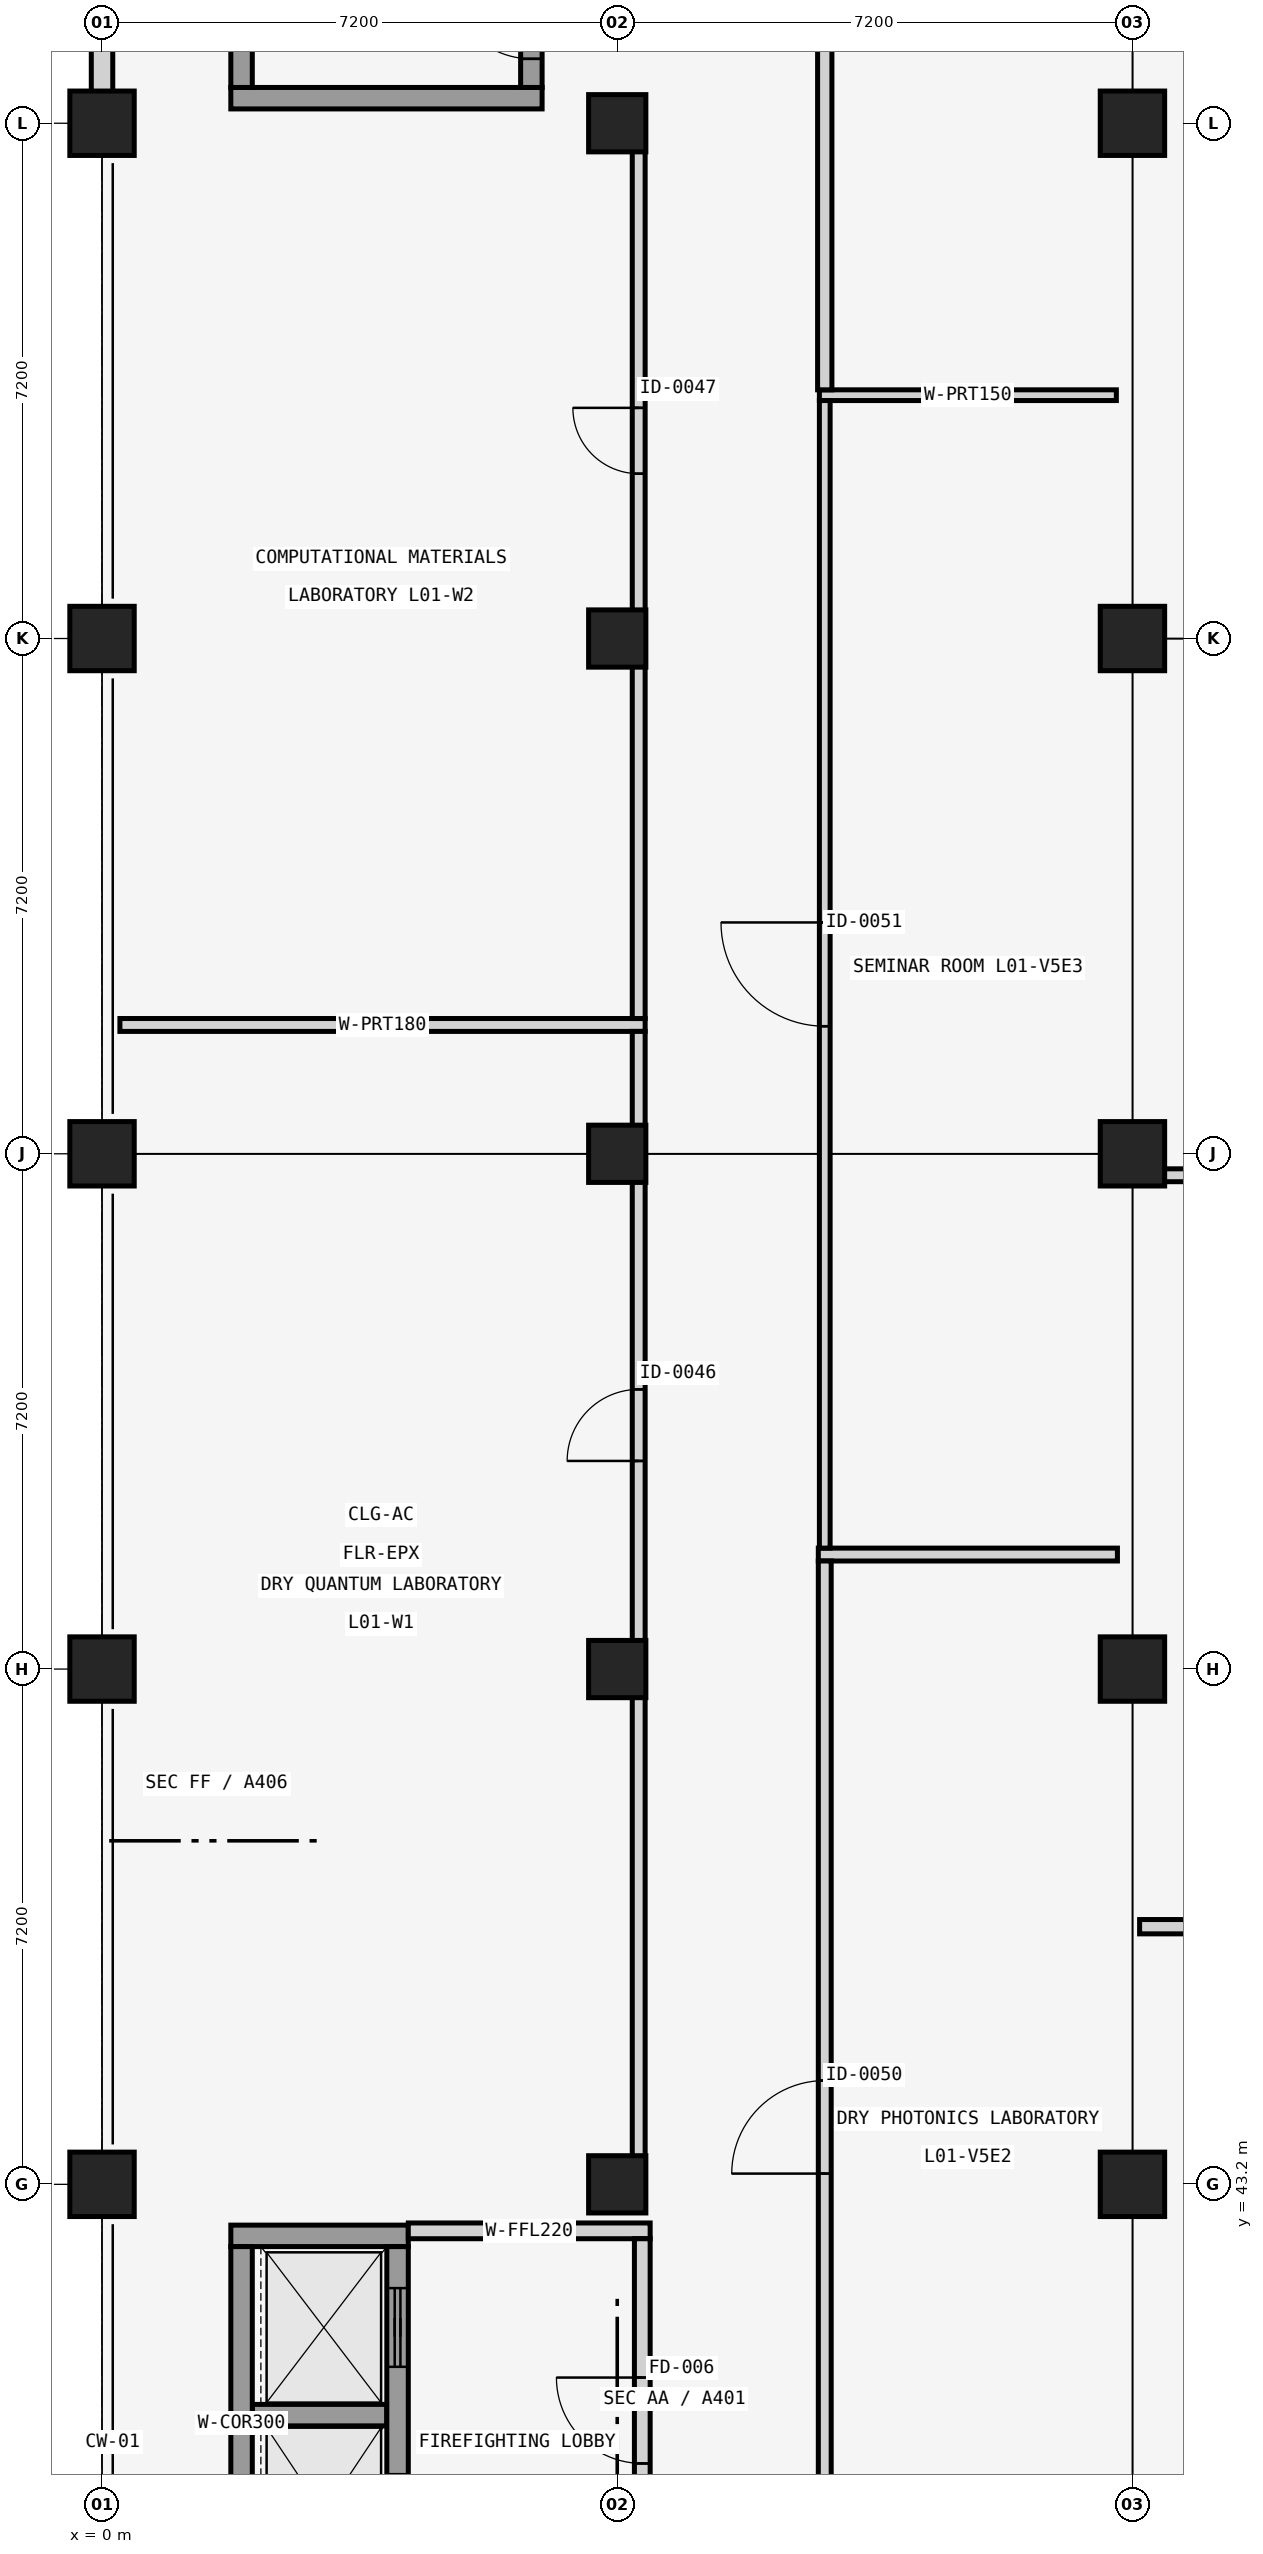
"""IFC4 building model, lengths in metres.
Left out: names, types, materials, properties, quantities, classifications, styles, units other than length and angle.
Written with IfcOpenShell. Run it as: python <this file> out.ifc"""

import sys

from ifc_helpers import new_model, si_unit, direction, frame, frame_2d, origin, origin_2d, place, context, subcontext, project, spatial, rectangle, extrude, element, fill, save


model = new_model("IFC4")
c1 = context("Model", 3, precision=1e-05, world=origin(), true_north=direction((0.0, 1.0)))
c2 = subcontext(c1, "Body", "Model", "MODEL_VIEW")
j1 = project(units=[si_unit("LENGTHUNIT", "METRE"), si_unit("PLANEANGLEUNIT", "RADIAN")], contexts=[c1])
p1 = place(None, origin())
s1 = spatial("IfcSite", under=j1, at=p1, CompositionType="ELEMENT")
p2 = place(p1, origin())
s2 = spatial("IfcBuilding", under=s1, at=p2, CompositionType="ELEMENT")
p3 = place(p2, frame((0.0, 0.0, 4.8)))
s3 = spatial("IfcBuildingStorey", under=s2, at=p3, CompositionType="ELEMENT", Elevation=4.8)
for number, where, z_axis, x_axis in (
    (1, (0.0, 43.2, 0.0), (0.0, 0.0, 1.0), (1.0, 0.0, 0.0)),
    (2, (0.0, 50.4, 0.0), (0.0, 0.0, 1.0), (1.0, 0.0, 0.0)),
    (3, (0.0, 57.6, 0.0), (0.0, 0.0, 1.0), (1.0, 0.0, 0.0)),
    (4, (0.0, 64.8, 0.0), (0.0, 0.0, 1.0), (1.0, 0.0, 0.0)),
    (5, (0.0, 72.0, 0.0), (0.0, 0.0, 1.0), (1.0, 0.0, 0.0)),
):
    element("IfcColumn", number, at=place(p3, frame(where, z_axis=z_axis, x_axis=x_axis)), inside=s3, PredefinedType="COLUMN", context=c2, shape_type="SweptSolid", body=[
        extrude(rectangle(XDim=0.9, YDim=0.9, at=origin_2d()), origin(), (0.0, 0.0, 1.0), 4.16),
    ])
for number, where, z_axis, x_axis in (
    (6, (7.2, 43.2, 0.0), (0.0, 0.0, 1.0), (1.0, 0.0, 0.0)),
    (7, (7.2, 50.4, 0.0), (0.0, 0.0, 1.0), (1.0, 0.0, 0.0)),
    (8, (7.2, 57.6, 0.0), (0.0, 0.0, 1.0), (1.0, 0.0, 0.0)),
    (9, (7.2, 64.8, 0.0), (0.0, 0.0, 1.0), (1.0, 0.0, 0.0)),
    (10, (7.2, 72.0, 0.0), (0.0, 0.0, 1.0), (1.0, 0.0, 0.0)),
):
    element("IfcColumn", number, at=place(p3, frame(where, z_axis=z_axis, x_axis=x_axis)), inside=s3, PredefinedType="COLUMN", context=c2, shape_type="SweptSolid", body=[
        extrude(rectangle(XDim=0.8, YDim=0.8, at=origin_2d()), origin(), (0.0, 0.0, 1.0), 4.16),
    ])
for number, where, z_axis, x_axis in (
    (11, (14.4, 43.2, 0.0), (0.0, 0.0, 1.0), (1.0, 0.0, 0.0)),
    (12, (14.4, 50.4, 0.0), (0.0, 0.0, 1.0), (1.0, 0.0, 0.0)),
    (13, (14.4, 57.6, 0.0), (0.0, 0.0, 1.0), (1.0, 0.0, 0.0)),
    (14, (14.4, 64.8, 0.0), (0.0, 0.0, 1.0), (1.0, 0.0, 0.0)),
    (15, (14.4, 72.0, 0.0), (0.0, 0.0, 1.0), (1.0, 0.0, 0.0)),
):
    element("IfcColumn", number, at=place(p3, frame(where, z_axis=z_axis, x_axis=x_axis)), inside=s3, PredefinedType="COLUMN", context=c2, shape_type="SweptSolid", body=[
        extrude(rectangle(XDim=0.9, YDim=0.9, at=origin_2d()), origin(), (0.0, 0.0, 1.0), 4.16),
    ])
p4 = place(p3, frame((0.0, 72.44, 0.0), z_axis=(0.0, 0.0, 1.0), x_axis=(0.0, 1.0, 0.0)))
e16 = element("IfcWall", 16, at=p4, inside=s3, PredefinedType="SOLIDWALL", context=c2, shape_type="SweptSolid", body=[
    extrude(rectangle(XDim=6.32, YDim=0.3, at=frame_2d((3.16, 0.0))), origin(), (0.0, 0.0, 1.0), 3.21),
])
p5 = place(p4, frame((2.935, 0.0, 0.65)))
e17 = element("IfcOpeningElement", 17, at=p5, cuts=e16, PredefinedType="OPENING", context=c2, shape_type="SweptSolid", body=[
    extrude(rectangle(XDim=0.45, YDim=2.4, at=frame_2d((0.225, 1.2))), frame((0.0, 0.16, 0.0), z_axis=(0.0, -1.0, 0.0), x_axis=(1.0, 0.0, 0.0)), (0.0, 0.0, 1.0), 0.32),
])
p6 = place(p3, frame((1.8, 42.48, 0.0), z_axis=(0.0, 0.0, 1.0), x_axis=(1.0, 0.0, 0.0)))
e18 = element("IfcWall", 18, at=p6, inside=s3, PredefinedType="SHEAR", context=c2, shape_type="SweptSolid", body=[
    extrude(rectangle(XDim=2.48, YDim=0.3, at=frame_2d((1.24, 0.0))), origin(), (0.0, 0.0, 1.0), 3.81),
])
p7 = place(p3, frame((2.1, 39.975, 0.0), z_axis=(0.0, 0.0, 1.0), x_axis=(1.0, 0.0, 0.0)))
e19 = element("IfcWall", 19, at=p7, inside=s3, PredefinedType="SHEAR", context=c2, shape_type="SweptSolid", body=[
    extrude(rectangle(XDim=1.88, YDim=0.3, at=frame_2d((0.94, 0.0))), origin(), (0.0, 0.0, 1.0), 3.81),
])
p8 = place(p3, frame((1.95, 37.4, 0.0), z_axis=(0.0, 0.0, 1.0), x_axis=(0.0, 1.0, 0.0)))
e20 = element("IfcWall", 20, at=p8, inside=s3, PredefinedType="SHEAR", context=c2, shape_type="SweptSolid", body=[
    extrude(rectangle(XDim=4.93, YDim=0.3, at=frame_2d((2.465, 0.0))), origin(), (0.0, 0.0, 1.0), 3.81),
])
p9 = place(p3, frame((4.13, 37.4, 0.0), z_axis=(0.0, 0.0, 1.0), x_axis=(0.0, 1.0, 0.0)))
e21 = element("IfcWall", 21, at=p9, inside=s3, PredefinedType="SHEAR", context=c2, shape_type="SweptSolid", body=[
    extrude(rectangle(XDim=4.93, YDim=0.3, at=frame_2d((2.465, 0.0))), origin(), (0.0, 0.0, 1.0), 3.81),
])
p10 = place(p9, frame((0.65, 0.0, 0.0)))
e22 = element("IfcOpeningElement", 22, at=p10, cuts=e21, PredefinedType="OPENING", context=c2, shape_type="SweptSolid", body=[
    extrude(rectangle(XDim=1.1, YDim=2.2, at=frame_2d((0.55, 1.1))), frame((0.0, 0.16, 0.0), z_axis=(0.0, -1.0, 0.0), x_axis=(1.0, 0.0, 0.0)), (0.0, 0.0, 1.0), 0.32),
])
p11 = place(p9, frame((3.25, 0.0, 0.0)))
e23 = element("IfcOpeningElement", 23, at=p11, cuts=e21, PredefinedType="OPENING", context=c2, shape_type="SweptSolid", body=[
    extrude(rectangle(XDim=1.1, YDim=2.2, at=frame_2d((0.55, 1.1))), frame((0.0, 0.16, 0.0), z_axis=(0.0, -1.0, 0.0), x_axis=(1.0, 0.0, 0.0)), (0.0, 0.0, 1.0), 0.32),
])
p12 = place(p3, frame((4.28, 42.55, 0.0), z_axis=(0.0, 0.0, 1.0), x_axis=(1.0, 0.0, 0.0)))
e24 = element("IfcWall", 24, at=p12, inside=s3, PredefinedType="SOLIDWALL", context=c2, shape_type="SweptSolid", body=[
    extrude(rectangle(XDim=3.38, YDim=0.22, at=frame_2d((1.69, 0.0))), origin(), (0.0, 0.0, 1.0), 2.81),
])
p13 = place(p3, frame((7.55, 37.36, 0.0), z_axis=(0.0, 0.0, 1.0), x_axis=(0.0, 1.0, 0.0)))
e25 = element("IfcWall", 25, at=p13, inside=s3, PredefinedType="SOLIDWALL", context=c2, shape_type="SweptSolid", body=[
    extrude(rectangle(XDim=5.08, YDim=0.22, at=frame_2d((2.54, 0.0))), origin(), (0.0, 0.0, 1.0), 3.51),
])
p14 = place(p13, frame((1.94, 0.0, 0.0)))
e26 = element("IfcOpeningElement", 26, at=p14, cuts=e25, PredefinedType="OPENING", context=c2, shape_type="SweptSolid", body=[
    extrude(rectangle(XDim=1.2, YDim=2.2, at=frame_2d((0.6, 1.1))), frame((0.0, 0.12, 0.0), z_axis=(0.0, -1.0, 0.0), x_axis=(1.0, 0.0, 0.0)), (0.0, 0.0, 1.0), 0.24),
])
p15 = place(p3, frame((1.8, 72.35, 0.0), z_axis=(0.0, 0.0, 1.0), x_axis=(1.0, 0.0, 0.0)))
e27 = element("IfcWall", 27, at=p15, inside=s3, PredefinedType="SHEAR", context=c2, shape_type="SweptSolid", body=[
    extrude(rectangle(XDim=4.35, YDim=0.3, at=frame_2d((2.175, 0.0))), origin(), (0.0, 0.0, 1.0), 3.81),
])
p16 = place(p3, frame((1.95, 72.5, 0.0), z_axis=(0.0, 0.0, 1.0), x_axis=(0.0, 1.0, 0.0)))
e28 = element("IfcWall", 28, at=p16, inside=s3, PredefinedType="SHEAR", context=c2, shape_type="SweptSolid", body=[
    extrude(rectangle(XDim=7.8, YDim=0.3, at=frame_2d((3.9, 0.0))), origin(), (0.0, 0.0, 1.0), 3.81),
])
p17 = place(p3, frame((6.0, 72.5, 0.0), z_axis=(0.0, 0.0, 1.0), x_axis=(0.0, 1.0, 0.0)))
e29 = element("IfcWall", 29, at=p17, inside=s3, PredefinedType="SHEAR", context=c2, shape_type="SweptSolid", body=[
    extrude(rectangle(XDim=7.8, YDim=0.3, at=frame_2d((3.9, 0.0))), origin(), (0.0, 0.0, 1.0), 3.81),
])
p18 = place(p17, frame((0.4, 0.0, 0.0)))
e30 = element("IfcOpeningElement", 30, at=p18, cuts=e29, PredefinedType="OPENING", context=c2, shape_type="SweptSolid", body=[
    extrude(rectangle(XDim=1.15, YDim=2.2, at=frame_2d((0.575, 1.1))), frame((0.0, 0.16, 0.0), z_axis=(0.0, -1.0, 0.0), x_axis=(1.0, 0.0, 0.0)), (0.0, 0.0, 1.0), 0.32),
])
p19 = place(p3, frame((0.25, 59.4, 0.0), z_axis=(0.0, 0.0, 1.0), x_axis=(1.0, 0.0, 0.0)))
e31 = element("IfcWall", 31, at=p19, inside=s3, PredefinedType="PARTITIONING", context=c2, shape_type="SweptSolid", body=[
    extrude(rectangle(XDim=7.34, YDim=0.18, at=frame_2d((3.67, 0.0))), origin(), (0.0, 0.0, 1.0), 3.21),
])
p20 = place(p3, frame((7.5, 43.59, 0.0), z_axis=(0.0, 0.0, 1.0), x_axis=(0.0, 1.0, 0.0)))
e32 = element("IfcWall", 32, at=p20, inside=s3, PredefinedType="PARTITIONING", context=c2, shape_type="SweptSolid", body=[
    extrude(rectangle(XDim=15.72, YDim=0.18, at=frame_2d((7.86, 0.0))), origin(), (0.0, 0.0, 1.0), 3.21),
])
p21 = place(p20, frame((9.718, 0.0, 0.0)))
e33 = element("IfcOpeningElement", 33, at=p21, cuts=e32, PredefinedType="OPENING", context=c2, shape_type="SweptSolid", body=[
    extrude(rectangle(XDim=1.0, YDim=2.1, at=frame_2d((0.5, 1.05))), frame((0.0, 0.1, 0.0), z_axis=(0.0, -1.0, 0.0), x_axis=(1.0, 0.0, 0.0)), (0.0, 0.0, 1.0), 0.2),
])
p22 = place(p3, frame((7.5, 59.49, 0.0), z_axis=(0.0, 0.0, 1.0), x_axis=(0.0, 1.0, 0.0)))
e34 = element("IfcWall", 34, at=p22, inside=s3, PredefinedType="PARTITIONING", context=c2, shape_type="SweptSolid", body=[
    extrude(rectangle(XDim=12.42, YDim=0.18, at=frame_2d((6.21, 0.0))), origin(), (0.0, 0.0, 1.0), 3.21),
])
p23 = place(p22, frame((7.613, 0.0, 0.0)))
e35 = element("IfcOpeningElement", 35, at=p23, cuts=e34, PredefinedType="OPENING", context=c2, shape_type="SweptSolid", body=[
    extrude(rectangle(XDim=0.92, YDim=2.15, at=frame_2d((0.46, 1.075))), frame((0.0, 0.1, 0.0), z_axis=(0.0, -1.0, 0.0), x_axis=(1.0, 0.0, 0.0)), (0.0, 0.0, 1.0), 0.2),
])
p24 = place(p3, frame((10.01, 52.0, 0.0), z_axis=(0.0, 0.0, 1.0), x_axis=(1.0, 0.0, 0.0)))
e36 = element("IfcWall", 36, at=p24, inside=s3, PredefinedType="PARTITIONING", context=c2, shape_type="SweptSolid", body=[
    extrude(rectangle(XDim=4.18, YDim=0.18, at=frame_2d((2.09, 0.0))), origin(), (0.0, 0.0, 1.0), 2.81),
])
p25 = place(p3, frame((10.1, 36.09, 0.0), z_axis=(0.0, 0.0, 1.0), x_axis=(0.0, 1.0, 0.0)))
e37 = element("IfcWall", 37, at=p25, inside=s3, PredefinedType="PARTITIONING", context=c2, shape_type="SweptSolid", body=[
    extrude(rectangle(XDim=15.82, YDim=0.18, at=frame_2d((7.91, 0.0))), origin(), (0.0, 0.0, 1.0), 3.21),
])
p26 = place(p25, frame((7.26, 0.0, 0.0)))
e38 = element("IfcOpeningElement", 38, at=p26, cuts=e37, PredefinedType="OPENING", context=c2, shape_type="SweptSolid", body=[
    extrude(rectangle(XDim=1.3, YDim=2.15, at=frame_2d((0.65, 1.075))), frame((0.0, 0.1, 0.0), z_axis=(0.0, -1.0, 0.0), x_axis=(1.0, 0.0, 0.0)), (0.0, 0.0, 1.0), 0.2),
])
p27 = place(p3, frame((10.025, 68.2, 0.0), z_axis=(0.0, 0.0, 1.0), x_axis=(1.0, 0.0, 0.0)))
e39 = element("IfcWall", 39, at=p27, inside=s3, PredefinedType="PARTITIONING", context=c2, shape_type="SweptSolid", body=[
    extrude(rectangle(XDim=4.15, YDim=0.15, at=frame_2d((2.075, 0.0))), origin(), (0.0, 0.0, 1.0), 3.26),
])
p28 = place(p3, frame((10.1, 52.09, 0.0), z_axis=(0.0, 0.0, 1.0), x_axis=(0.0, 1.0, 0.0)))
e40 = element("IfcWall", 40, at=p28, inside=s3, PredefinedType="PARTITIONING", context=c2, shape_type="SweptSolid", body=[
    extrude(rectangle(XDim=16.035, YDim=0.15, at=frame_2d((8.018, 0.0))), origin(), (0.0, 0.0, 1.0), 3.21),
])
p29 = place(p28, frame((7.292, 0.0, 0.0)))
e41 = element("IfcOpeningElement", 41, at=p29, cuts=e40, PredefinedType="OPENING", context=c2, shape_type="SweptSolid", body=[
    extrude(rectangle(XDim=1.45, YDim=2.2, at=frame_2d((0.725, 1.1))), frame((0.0, 0.085, 0.0), z_axis=(0.0, -1.0, 0.0), x_axis=(1.0, 0.0, 0.0)), (0.0, 0.0, 1.0), 0.17),
])
p30 = place(p3, frame((10.1, 68.275, 0.0), z_axis=(0.0, 0.0, 1.0), x_axis=(0.0, 1.0, 0.0)))
e42 = element("IfcWall", 42, at=p30, inside=s3, PredefinedType="PARTITIONING", context=c2, shape_type="SweptSolid", body=[
    extrude(rectangle(XDim=17.725, YDim=0.2, at=frame_2d((8.863, 0.0))), origin(), (0.0, 0.0, 1.0), 3.21),
])
p31 = place(p30, frame((7.988, 0.0, 0.0)))
e43 = element("IfcOpeningElement", 43, at=p31, cuts=e42, PredefinedType="OPENING", context=c2, shape_type="SweptSolid", body=[
    extrude(rectangle(XDim=1.75, YDim=2.25, at=frame_2d((0.875, 1.125))), frame((0.0, 0.11, 0.0), z_axis=(0.0, -1.0, 0.0), x_axis=(1.0, 0.0, 0.0)), (0.0, 0.0, 1.0), 0.22),
])
p32 = place(p3, frame((14.5, 46.8, 0.0), z_axis=(0.0, 0.0, 1.0), x_axis=(1.0, 0.0, 0.0)))
e44 = element("IfcWall", 44, at=p32, inside=s3, PredefinedType="PARTITIONING", context=c2, shape_type="SweptSolid", body=[
    extrude(rectangle(XDim=21.6, YDim=0.2, at=frame_2d((10.8, 0.0))), origin(), (0.0, 0.0, 1.0), 2.81),
])
p33 = place(p3, frame((14.51, 57.3, 0.0), z_axis=(0.0, 0.0, 1.0), x_axis=(1.0, 0.0, 0.0)))
e45 = element("IfcWall", 45, at=p33, inside=s3, PredefinedType="PARTITIONING", context=c2, shape_type="SweptSolid", body=[
    extrude(rectangle(XDim=21.58, YDim=0.18, at=frame_2d((10.79, 0.0))), origin(), (0.0, 0.0, 1.0), 2.81),
])
p34 = place(p33, frame((10.225, 0.0, 0.0)))
e46 = element("IfcOpeningElement", 46, at=p34, cuts=e45, PredefinedType="OPENING", context=c2, shape_type="SweptSolid", body=[
    extrude(rectangle(XDim=1.13, YDim=2.08, at=frame_2d((0.565, 1.04))), frame((0.0, 0.1, 0.0), z_axis=(0.0, -1.0, 0.0), x_axis=(1.0, 0.0, 0.0)), (0.0, 0.0, 1.0), 0.2),
])
p35 = place(p11, origin())
e47 = element("IfcDoor", 47, at=p35, inside=s3, OperationType="SLIDING_TO_LEFT", PredefinedType="DOOR", context=c2, shape_type="SweptSolid", body=[
    extrude(rectangle(XDim=1.1, YDim=2.2, at=frame_2d((0.55, 1.1))), frame((0.0, 0.025, 0.0), z_axis=(0.0, -1.0, 0.0), x_axis=(1.0, 0.0, 0.0)), (0.0, 0.0, 1.0), 0.05),
])
fill(e23, e47)
p36 = place(p14, origin())
e48 = element("IfcDoor", 48, at=p36, inside=s3, OperationType="SINGLE_SWING_RIGHT", PredefinedType="DOOR", context=c2, shape_type="SweptSolid", body=[
    extrude(rectangle(XDim=1.2, YDim=2.2, at=frame_2d((0.6, 1.1))), frame((0.0, 0.025, 0.0), z_axis=(0.0, -1.0, 0.0), x_axis=(1.0, 0.0, 0.0)), (0.0, 0.0, 1.0), 0.05),
])
fill(e26, e48)
p37 = place(p18, origin())
e49 = element("IfcDoor", 49, at=p37, inside=s3, OperationType="SINGLE_SWING_RIGHT", PredefinedType="DOOR", context=c2, shape_type="SweptSolid", body=[
    extrude(rectangle(XDim=1.15, YDim=2.2, at=frame_2d((0.575, 1.1))), frame((0.0, 0.025, 0.0), z_axis=(0.0, -1.0, 0.0), x_axis=(1.0, 0.0, 0.0)), (0.0, 0.0, 1.0), 0.05),
])
fill(e30, e49)
p38 = place(p21, origin())
e50 = element("IfcDoor", 50, at=p38, inside=s3, OperationType="SINGLE_SWING_LEFT", PredefinedType="DOOR", context=c2, shape_type="SweptSolid", body=[
    extrude(rectangle(XDim=1.0, YDim=2.1, at=frame_2d((0.5, 1.05))), frame((0.0, 0.025, 0.0), z_axis=(0.0, -1.0, 0.0), x_axis=(1.0, 0.0, 0.0)), (0.0, 0.0, 1.0), 0.05),
])
fill(e33, e50)
p39 = place(p23, origin())
e51 = element("IfcDoor", 51, at=p39, inside=s3, OperationType="SINGLE_SWING_RIGHT", PredefinedType="DOOR", context=c2, shape_type="SweptSolid", body=[
    extrude(rectangle(XDim=0.92, YDim=2.15, at=frame_2d((0.46, 1.075))), frame((0.0, 0.025, 0.0), z_axis=(0.0, -1.0, 0.0), x_axis=(1.0, 0.0, 0.0)), (0.0, 0.0, 1.0), 0.05),
])
fill(e35, e51)
p40 = place(p26, origin())
e52 = element("IfcDoor", 52, at=p40, inside=s3, OperationType="SINGLE_SWING_LEFT", PredefinedType="DOOR", context=c2, shape_type="SweptSolid", body=[
    extrude(rectangle(XDim=1.3, YDim=2.15, at=frame_2d((0.65, 1.075))), frame((0.0, 0.025, 0.0), z_axis=(0.0, -1.0, 0.0), x_axis=(1.0, 0.0, 0.0)), (0.0, 0.0, 1.0), 0.05),
])
fill(e38, e52)
p41 = place(p29, origin())
e53 = element("IfcDoor", 53, at=p41, inside=s3, OperationType="SINGLE_SWING_RIGHT", PredefinedType="DOOR", context=c2, shape_type="SweptSolid", body=[
    extrude(rectangle(XDim=1.45, YDim=2.2, at=frame_2d((0.725, 1.1))), frame((0.0, 0.025, 0.0), z_axis=(0.0, -1.0, 0.0), x_axis=(1.0, 0.0, 0.0)), (0.0, 0.0, 1.0), 0.05),
])
fill(e41, e53)
save(model, sys.argv[1])
